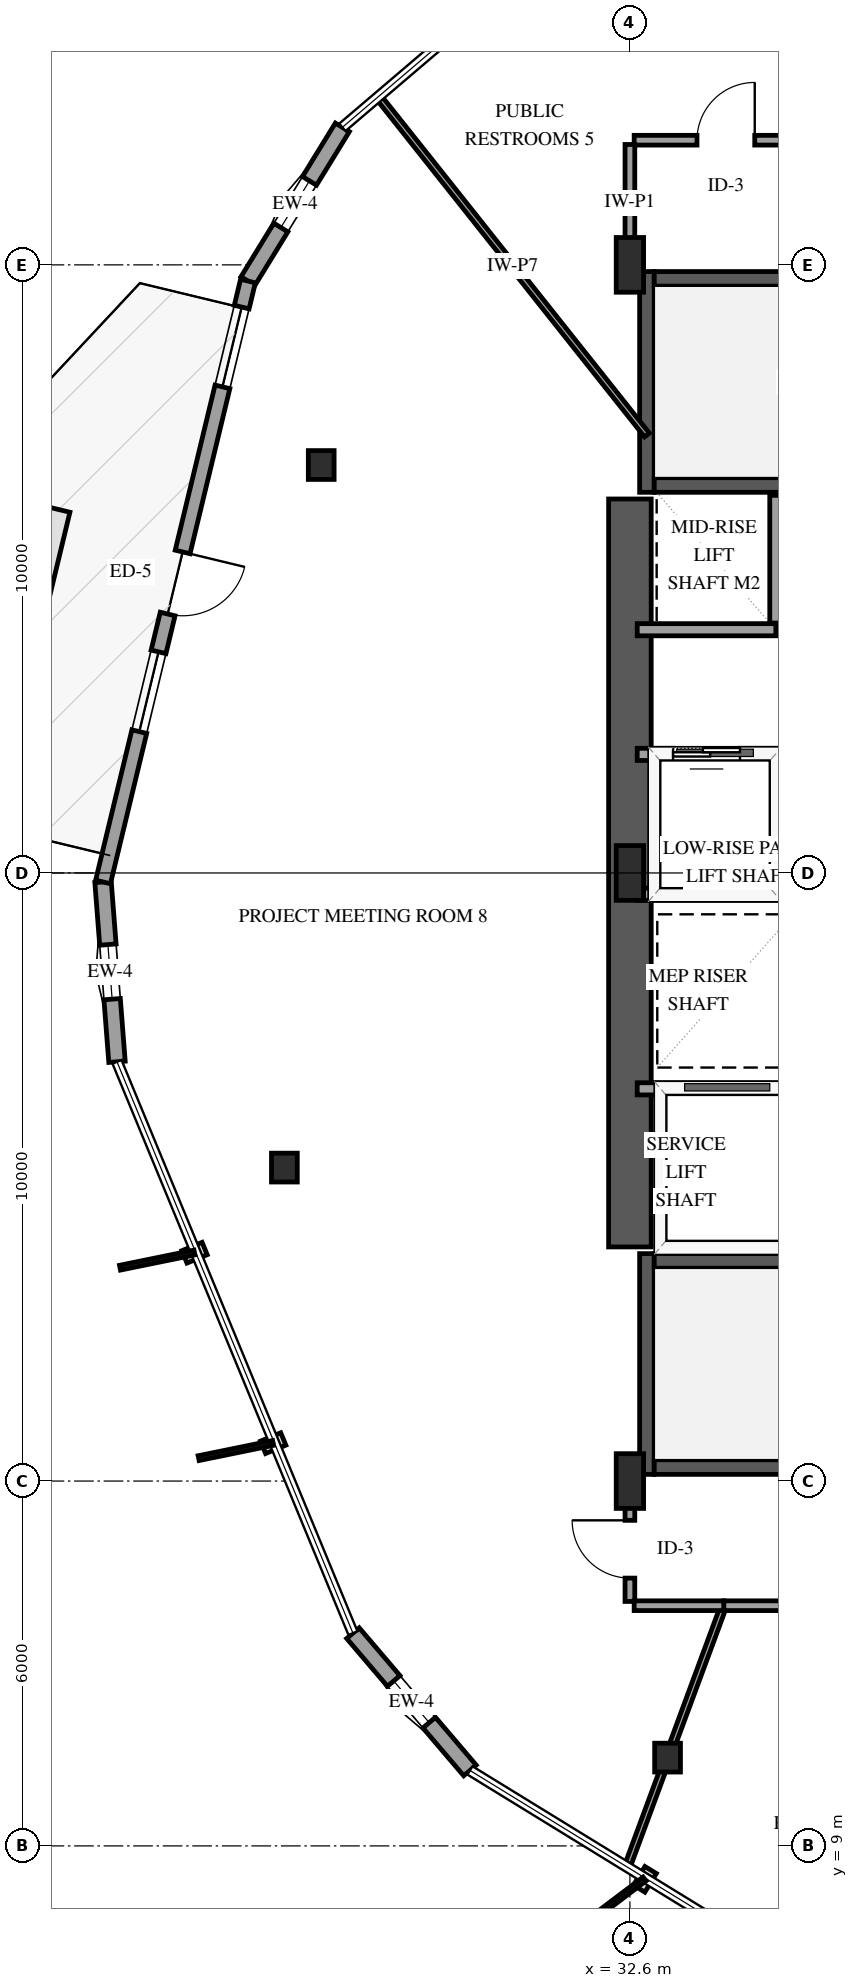
"""IFC4 building model, lengths in metres.
Left out: names, types, materials, properties, quantities, classifications, styles, units other than length and angle.
Written with IfcOpenShell. Run it as: python <this file> out.ifc"""

import sys

from ifc_helpers import new_model, si_unit, direction, frame, frame_2d, origin, origin_2d, place, context, subcontext, project, spatial, rectangle, i_section, extrude, element, fill, save


model = new_model("IFC4")
c1 = context("Model", 3, precision=1e-05, world=origin(), true_north=direction((0.0, 1.0)))
c2 = subcontext(c1, "Body", "Model", "MODEL_VIEW")
j1 = project(units=[si_unit("LENGTHUNIT", "METRE"), si_unit("PLANEANGLEUNIT", "RADIAN")], contexts=[c1])
p1 = place(None, origin())
s1 = spatial("IfcSite", under=j1, at=p1, CompositionType="ELEMENT")
p2 = place(p1, origin())
s2 = spatial("IfcBuilding", under=s1, at=p2, CompositionType="ELEMENT")
p3 = place(p2, frame((0.0, 0.0, 50.6)))
s3 = spatial("IfcBuildingStorey", under=s2, at=p3, CompositionType="ELEMENT", Elevation=50.6)
p4 = place(p3, frame((32.88, 15.11, 0.0), z_axis=(0.0, 0.0, 1.0), x_axis=(0.0, 1.0, 0.0)))
e1 = element("IfcWall", 1, at=p4, inside=s3, PredefinedType="SHEAR", context=c2, shape_type="SweptSolid", body=[
    extrude(rectangle(XDim=3.63, YDim=0.24, at=frame_2d((1.815, 0.0))), origin(), (0.0, 0.0, 1.0), 4.0),
])
for number, where, z_axis, x_axis in (
    (2, (33.0, 15.23, 0.0), (0.0, 0.0, 1.0), (1.0, 0.0, 0.0)),
    (3, (33.0, 18.62, 0.0), (0.0, 0.0, 1.0), (1.0, 0.0, 0.0)),
):
    element("IfcWall", number, at=place(p3, frame(where, z_axis=z_axis, x_axis=x_axis)), inside=s3, PredefinedType="SHEAR", context=c2, shape_type="SweptSolid", body=[
        extrude(rectangle(XDim=8.0, YDim=0.24, at=frame_2d((4.0, 0.0))), origin(), (0.0, 0.0, 1.0), 4.0),
    ])
p5 = place(p3, frame((32.88, 31.26, 0.0), z_axis=(0.0, 0.0, 1.0), x_axis=(0.0, 1.0, 0.0)))
e4 = element("IfcWall", 4, at=p5, inside=s3, PredefinedType="SHEAR", context=c2, shape_type="SweptSolid", body=[
    extrude(rectangle(XDim=3.63, YDim=0.24, at=frame_2d((1.815, 0.0))), origin(), (0.0, 0.0, 1.0), 4.0),
])
for number, where, z_axis, x_axis in (
    (5, (33.0, 31.38, 0.0), (0.0, 0.0, 1.0), (1.0, 0.0, 0.0)),
    (6, (33.0, 34.77, 0.0), (0.0, 0.0, 1.0), (1.0, 0.0, 0.0)),
):
    element("IfcWall", number, at=place(p3, frame(where, z_axis=z_axis, x_axis=x_axis)), inside=s3, PredefinedType="SHEAR", context=c2, shape_type="SweptSolid", body=[
        extrude(rectangle(XDim=8.0, YDim=0.24, at=frame_2d((4.0, 0.0))), origin(), (0.0, 0.0, 1.0), 4.0),
    ])
p6 = place(p3, frame((32.6, 18.85, 0.0), z_axis=(0.0, 0.0, 1.0), x_axis=(0.0, 1.0, 0.0)))
e7 = element("IfcWall", 7, at=p6, inside=s3, PredefinedType="SHEAR", context=c2, shape_type="SweptSolid", body=[
    extrude(rectangle(XDim=12.3, YDim=0.7, at=frame_2d((6.15, 0.0))), origin(), (0.0, 0.0, 1.0), 4.0),
])
for number, where, z_axis, x_axis in (
    (8, (32.6, 15.0, 0.0), (0.0, 0.0, 1.0), (1.0, 0.0, 0.0)),
    (9, (32.6, 25.0, 0.0), (0.0, 0.0, 1.0), (1.0, 0.0, 0.0)),
    (10, (32.6, 35.0, 0.0), (0.0, 0.0, 1.0), (1.0, 0.0, 0.0)),
):
    element("IfcColumn", number, at=place(p3, frame(where, z_axis=z_axis, x_axis=x_axis)), inside=s3, PredefinedType="PILASTER", context=c2, shape_type="SweptSolid", body=[
        extrude(rectangle(XDim=0.45, YDim=0.9, at=origin_2d()), origin(), (0.0, 0.0, 1.0), 4.0),
    ])
for number, where, z_axis, x_axis in (
    (11, (27.523, 31.708, 0.0), (0.0, 0.0, 1.0), (1.0, 0.0, 0.0)),
    (12, (26.918, 20.155, 0.0), (0.0, 0.0, 1.0), (1.0, 0.0, 0.0)),
    (13, (33.219, 10.452, 0.0), (0.0, 0.0, 1.0), (1.0, 0.0, 0.0)),
):
    element("IfcColumn", number, at=place(p3, frame(where, z_axis=z_axis, x_axis=x_axis)), inside=s3, PredefinedType="COLUMN", context=c2, shape_type="SweptSolid", body=[
        extrude(i_section(OverallWidth=0.424, OverallDepth=0.474, WebThickness=0.048, FlangeThickness=0.077, FilletRadius=0.038, at=origin_2d()), origin(), (0.0, 0.0, 1.0), 4.0),
    ])
p7 = place(p3, frame((27.872, 37.262, 0.0), z_axis=(0.0, 0.0, 1.0), x_axis=(-0.523399327402, -0.852087521371, 0.0)))
e14 = element("IfcWall", 14, at=p7, inside=s3, PredefinedType="SOLIDWALL", context=c2, shape_type="SweptSolid", body=[
    extrude(rectangle(XDim=2.967, YDim=0.27, at=frame_2d((1.483, 0.0))), origin(), (0.0, 0.0, 1.0), 3.079),
])
p8 = place(p7, frame((1.033, 0.0, 0.75)))
e15 = element("IfcOpeningElement", 15, at=p8, cuts=e14, PredefinedType="OPENING", context=c2, shape_type="SweptSolid", body=[
    extrude(rectangle(XDim=0.9, YDim=1.5, at=frame_2d((0.45, 0.75))), frame((0.0, 0.145, 0.0), z_axis=(0.0, -1.0, 0.0), x_axis=(1.0, 0.0, 0.0)), (0.0, 0.0, 1.0), 0.29),
])
p9 = place(p3, frame((23.936, 24.852, 0.0), z_axis=(0.0, 0.0, 1.0), x_axis=(0.077363609715, -0.997002944776, 0.0)))
e16 = element("IfcWall", 16, at=p9, inside=s3, PredefinedType="SOLIDWALL", context=c2, shape_type="SweptSolid", body=[
    extrude(rectangle(XDim=2.966, YDim=0.27, at=frame_2d((1.483, 0.0))), origin(), (0.0, 0.0, 1.0), 3.079),
])
p10 = place(p9, frame((1.033, 0.0, 0.75)))
e17 = element("IfcOpeningElement", 17, at=p10, cuts=e16, PredefinedType="OPENING", context=c2, shape_type="SweptSolid", body=[
    extrude(rectangle(XDim=0.9, YDim=1.5, at=frame_2d((0.45, 0.75))), frame((0.0, 0.145, 0.0), z_axis=(0.0, -1.0, 0.0), x_axis=(1.0, 0.0, 0.0)), (0.0, 0.0, 1.0), 0.29),
])
p11 = place(p3, frame((26.319, 34.734, 0.0), z_axis=(0.0, 0.0, 1.0), x_axis=(-0.234457403368, -0.972126394049, 0.0)))
e18 = element("IfcWall", 18, at=p11, inside=s3, PredefinedType="SOLIDWALL", context=c2, shape_type="SweptSolid", body=[
    extrude(rectangle(XDim=10.165, YDim=0.25, at=frame_2d((5.083, 0.0))), origin(), (0.0, 0.0, 1.0), 3.079),
])
p12 = place(p11, frame((4.583, 0.0, 0.0)))
e19 = element("IfcOpeningElement", 19, at=p12, cuts=e18, PredefinedType="OPENING", context=c2, shape_type="SweptSolid", body=[
    extrude(rectangle(XDim=1.05, YDim=2.15, at=frame_2d((0.525, 1.075))), frame((0.0, 0.135, 0.0), z_axis=(0.0, -1.0, 0.0), x_axis=(1.0, 0.0, 0.0)), (0.0, 0.0, 1.0), 0.27),
])
p13 = place(p11, frame((0.44, 0.0, 0.72)))
e20 = element("IfcOpeningElement", 20, at=p13, cuts=e18, PredefinedType="OPENING", context=c2, shape_type="SweptSolid", body=[
    extrude(rectangle(XDim=1.35, YDim=1.65, at=frame_2d((0.675, 0.825))), frame((0.0, 0.135, 0.0), z_axis=(0.0, -1.0, 0.0), x_axis=(1.0, 0.0, 0.0)), (0.0, 0.0, 1.0), 0.27),
])
p14 = place(p11, frame((6.273, 0.0, 0.72)))
e21 = element("IfcOpeningElement", 21, at=p14, cuts=e18, PredefinedType="OPENING", context=c2, shape_type="SweptSolid", body=[
    extrude(rectangle(XDim=1.35, YDim=1.65, at=frame_2d((0.675, 0.825))), frame((0.0, 0.135, 0.0), z_axis=(0.0, -1.0, 0.0), x_axis=(1.0, 0.0, 0.0)), (0.0, 0.0, 1.0), 0.27),
])
p15 = place(p3, frame((28.045, 12.499, 0.0), z_axis=(0.0, 0.0, 1.0), x_axis=(0.648613054241, -0.761118325799, 0.0)))
e22 = element("IfcWall", 22, at=p15, inside=s3, PredefinedType="SOLIDWALL", context=c2, shape_type="SweptSolid", body=[
    extrude(rectangle(XDim=2.967, YDim=0.27, at=frame_2d((1.483, 0.0))), origin(), (0.0, 0.0, 1.0), 3.079),
])
p16 = place(p15, frame((1.033, 0.0, 0.75)))
e23 = element("IfcOpeningElement", 23, at=p16, cuts=e22, PredefinedType="OPENING", context=c2, shape_type="SweptSolid", body=[
    extrude(rectangle(XDim=0.9, YDim=1.5, at=frame_2d((0.45, 0.75))), frame((0.0, 0.145, 0.0), z_axis=(0.0, -1.0, 0.0), x_axis=(1.0, 0.0, 0.0)), (0.0, 0.0, 1.0), 0.29),
])
p17 = place(p3, frame((32.72, 21.45, 0.0), z_axis=(0.0, 0.0, 1.0), x_axis=(1.0, 0.0, 0.0)))
e24 = element("IfcWall", 24, at=p17, inside=s3, PredefinedType="SOLIDWALL", context=c2, shape_type="SweptSolid", body=[
    extrude(rectangle(XDim=2.58, YDim=0.2, at=frame_2d((1.29, 0.0))), origin(), (0.0, 0.0, 1.0), 3.7),
])
p18 = place(p3, frame((32.72, 24.65, 0.0), z_axis=(0.0, 0.0, 1.0), x_axis=(1.0, 0.0, 0.0)))
e25 = element("IfcWall", 25, at=p18, inside=s3, PredefinedType="SOLIDWALL", context=c2, shape_type="SweptSolid", body=[
    extrude(rectangle(XDim=2.28, YDim=0.2, at=frame_2d((1.14, 0.0))), origin(), (0.0, 0.0, 1.0), 3.7),
])
p19 = place(p3, frame((32.72, 26.95, 0.0), z_axis=(0.0, 0.0, 1.0), x_axis=(1.0, 0.0, 0.0)))
e26 = element("IfcWall", 26, at=p19, inside=s3, PredefinedType="SOLIDWALL", context=c2, shape_type="SweptSolid", body=[
    extrude(rectangle(XDim=2.28, YDim=0.2, at=frame_2d((1.14, 0.0))), origin(), (0.0, 0.0, 1.0), 3.7),
])
p20 = place(p19, frame((0.59, 0.0, 0.0)))
e27 = element("IfcOpeningElement", 27, at=p20, cuts=e26, PredefinedType="OPENING", context=c2, shape_type="SweptSolid", body=[
    extrude(rectangle(XDim=1.1, YDim=2.15, at=frame_2d((0.55, 1.075))), frame((0.0, 0.11, 0.0), z_axis=(0.0, -1.0, 0.0), x_axis=(1.0, 0.0, 0.0)), (0.0, 0.0, 1.0), 0.22),
])
p21 = place(p3, frame((35.0, 24.76, 0.0), z_axis=(0.0, 0.0, 1.0), x_axis=(0.0, 1.0, 0.0)))
e28 = element("IfcWall", 28, at=p21, inside=s3, PredefinedType="SOLIDWALL", context=c2, shape_type="SweptSolid", body=[
    extrude(rectangle(XDim=2.08, YDim=0.2, at=frame_2d((1.04, 0.0))), origin(), (0.0, 0.0, 1.0), 3.7),
])
p22 = place(p3, frame((32.72, 29.0, 0.0), z_axis=(0.0, 0.0, 1.0), x_axis=(1.0, 0.0, 0.0)))
e29 = element("IfcWall", 29, at=p22, inside=s3, PredefinedType="SOLIDWALL", context=c2, shape_type="SweptSolid", body=[
    extrude(rectangle(XDim=2.28, YDim=0.2, at=frame_2d((1.14, 0.0))), origin(), (0.0, 0.0, 1.0), 3.7),
])
p23 = place(p3, frame((35.0, 29.11, 0.0), z_axis=(0.0, 0.0, 1.0), x_axis=(0.0, 1.0, 0.0)))
e30 = element("IfcWall", 30, at=p23, inside=s3, PredefinedType="SOLIDWALL", context=c2, shape_type="SweptSolid", body=[
    extrude(rectangle(XDim=2.1, YDim=0.2, at=frame_2d((1.05, 0.0))), origin(), (0.0, 0.0, 1.0), 3.7),
])
p24 = place(p3, frame((32.88, 32.202, 0.0), z_axis=(0.0, 0.0, 1.0), x_axis=(-0.621908178435, 0.783090172072, 0.0)))
e31 = element("IfcWall", 31, at=p24, inside=s3, PredefinedType="PARTITIONING", context=c2, shape_type="SweptSolid", body=[
    extrude(rectangle(XDim=7.104, YDim=0.1, at=frame_2d((3.552, 0.0))), origin(), (0.0, 0.0, 1.0), 3.7),
])
p25 = place(p3, frame((35.687, 37.05, 0.0), z_axis=(0.0, 0.0, 1.0), x_axis=(-0.235013634281, 0.971992073888, 0.0)))
e32 = element("IfcWall", 32, at=p25, inside=s3, PredefinedType="PARTITIONING", context=c2, shape_type="SweptSolid", body=[
    extrude(rectangle(XDim=5.863, YDim=0.13, at=frame_2d((2.932, 0.0))), origin(), (0.0, 0.0, 1.0), 2.995),
])
p26 = place(p3, frame((34.143, 12.95, 0.0), z_axis=(0.0, 0.0, 1.0), x_axis=(-0.346937618719, -0.93788820694, 0.0)))
e33 = element("IfcWall", 33, at=p26, inside=s3, PredefinedType="PARTITIONING", context=c2, shape_type="SweptSolid", body=[
    extrude(rectangle(XDim=4.58, YDim=0.1, at=frame_2d((2.29, 0.0))), origin(), (0.0, 0.0, 1.0), 2.995),
])
p27 = place(p3, frame((38.479, 12.95, 0.0), z_axis=(0.0, 0.0, 1.0), x_axis=(-1.0, 0.0, 0.0)))
e34 = element("IfcWall", 34, at=p27, inside=s3, PredefinedType="PARTITIONING", context=c2, shape_type="SweptSolid", body=[
    extrude(rectangle(XDim=4.336, YDim=0.16, at=frame_2d((2.168, 0.0))), origin(), (0.0, 0.0, 1.0), 3.7),
])
p28 = place(p27, frame((1.693, 0.0, 0.0)))
e35 = element("IfcOpeningElement", 35, at=p28, cuts=e34, PredefinedType="OPENING", context=c2, shape_type="SweptSolid", body=[
    extrude(rectangle(XDim=0.95, YDim=2.15, at=frame_2d((0.475, 1.075))), frame((0.0, 0.09, 0.0), z_axis=(0.0, -1.0, 0.0), x_axis=(1.0, 0.0, 0.0)), (0.0, 0.0, 1.0), 0.18),
])
p29 = place(p3, frame((32.67, 37.05, 0.0), z_axis=(0.0, 0.0, 1.0), x_axis=(1.0, 0.0, 0.0)))
e36 = element("IfcWall", 36, at=p29, inside=s3, PredefinedType="PARTITIONING", context=c2, shape_type="SweptSolid", body=[
    extrude(rectangle(XDim=3.017, YDim=0.16, at=frame_2d((1.509, 0.0))), origin(), (0.0, 0.0, 1.0), 3.7),
])
p30 = place(p29, frame((1.033, 0.0, 0.0)))
e37 = element("IfcOpeningElement", 37, at=p30, cuts=e36, PredefinedType="OPENING", context=c2, shape_type="SweptSolid", body=[
    extrude(rectangle(XDim=0.95, YDim=2.15, at=frame_2d((0.475, 1.075))), frame((0.0, 0.09, 0.0), z_axis=(0.0, -1.0, 0.0), x_axis=(1.0, 0.0, 0.0)), (0.0, 0.0, 1.0), 0.18),
])
p31 = place(p3, frame((32.6, 13.02, 0.0), z_axis=(0.0, 0.0, 1.0), x_axis=(0.0, 1.0, 0.0)))
e38 = element("IfcWall", 38, at=p31, inside=s3, PredefinedType="PARTITIONING", context=c2, shape_type="SweptSolid", body=[
    extrude(rectangle(XDim=1.91, YDim=0.16, at=frame_2d((0.955, 0.0))), origin(), (0.0, 0.0, 1.0), 3.7),
])
p32 = place(p31, frame((0.384, 0.0, 0.0)))
e39 = element("IfcOpeningElement", 39, at=p32, cuts=e38, PredefinedType="OPENING", context=c2, shape_type="SweptSolid", body=[
    extrude(rectangle(XDim=0.95, YDim=2.15, at=frame_2d((0.475, 1.075))), frame((0.0, 0.09, 0.0), z_axis=(0.0, -1.0, 0.0), x_axis=(1.0, 0.0, 0.0)), (0.0, 0.0, 1.0), 0.18),
])
p33 = place(p3, frame((32.6, 35.07, 0.0), z_axis=(0.0, 0.0, 1.0), x_axis=(0.0, 1.0, 0.0)))
e40 = element("IfcWall", 40, at=p33, inside=s3, PredefinedType="PARTITIONING", context=c2, shape_type="SweptSolid", body=[
    extrude(rectangle(XDim=1.91, YDim=0.16, at=frame_2d((0.955, 0.0))), origin(), (0.0, 0.0, 1.0), 3.7),
])
p34 = place(p3, frame((34.143, 12.95, 0.0), z_axis=(0.0, 0.0, 1.0), x_axis=(-1.0, 0.0, 0.0)))
e41 = element("IfcWall", 41, at=p34, inside=s3, PredefinedType="PARTITIONING", context=c2, shape_type="SweptSolid", body=[
    extrude(rectangle(XDim=1.473, YDim=0.16, at=frame_2d((0.737, 0.0))), origin(), (0.0, 0.0, 1.0), 3.7),
])
p35 = place(p8, origin())
e42 = element("IfcWindow", 42, at=p35, inside=s3, PartitioningType="SINGLE_PANEL", PredefinedType="WINDOW", context=c2, shape_type="SweptSolid", body=[
    extrude(rectangle(XDim=0.9, YDim=1.5, at=frame_2d((0.45, 0.75))), frame((0.0, 0.03, 0.0), z_axis=(0.0, -1.0, 0.0), x_axis=(1.0, 0.0, 0.0)), (0.0, 0.0, 1.0), 0.06),
])
fill(e15, e42)
p36 = place(p10, origin())
e43 = element("IfcWindow", 43, at=p36, inside=s3, PartitioningType="SINGLE_PANEL", PredefinedType="WINDOW", context=c2, shape_type="SweptSolid", body=[
    extrude(rectangle(XDim=0.9, YDim=1.5, at=frame_2d((0.45, 0.75))), frame((0.0, 0.03, 0.0), z_axis=(0.0, -1.0, 0.0), x_axis=(1.0, 0.0, 0.0)), (0.0, 0.0, 1.0), 0.06),
])
fill(e17, e43)
p37 = place(p12, origin())
e44 = element("IfcDoor", 44, at=p37, inside=s3, OperationType="SINGLE_SWING_LEFT", PredefinedType="DOOR", context=c2, shape_type="SweptSolid", body=[
    extrude(rectangle(XDim=1.05, YDim=2.15, at=frame_2d((0.525, 1.075))), frame((0.0, 0.025, 0.0), z_axis=(0.0, -1.0, 0.0), x_axis=(1.0, 0.0, 0.0)), (0.0, 0.0, 1.0), 0.05),
])
fill(e19, e44)
p38 = place(p13, origin())
e45 = element("IfcWindow", 45, at=p38, inside=s3, PartitioningType="SINGLE_PANEL", PredefinedType="WINDOW", context=c2, shape_type="SweptSolid", body=[
    extrude(rectangle(XDim=1.35, YDim=1.65, at=frame_2d((0.675, 0.825))), frame((0.0, 0.03, 0.0), z_axis=(0.0, -1.0, 0.0), x_axis=(1.0, 0.0, 0.0)), (0.0, 0.0, 1.0), 0.06),
])
fill(e20, e45)
p39 = place(p14, origin())
e46 = element("IfcWindow", 46, at=p39, inside=s3, PartitioningType="SINGLE_PANEL", PredefinedType="WINDOW", context=c2, shape_type="SweptSolid", body=[
    extrude(rectangle(XDim=1.35, YDim=1.65, at=frame_2d((0.675, 0.825))), frame((0.0, 0.03, 0.0), z_axis=(0.0, -1.0, 0.0), x_axis=(1.0, 0.0, 0.0)), (0.0, 0.0, 1.0), 0.06),
])
fill(e21, e46)
p40 = place(p16, origin())
e47 = element("IfcWindow", 47, at=p40, inside=s3, PartitioningType="SINGLE_PANEL", PredefinedType="WINDOW", context=c2, shape_type="SweptSolid", body=[
    extrude(rectangle(XDim=0.9, YDim=1.5, at=frame_2d((0.45, 0.75))), frame((0.0, 0.03, 0.0), z_axis=(0.0, -1.0, 0.0), x_axis=(1.0, 0.0, 0.0)), (0.0, 0.0, 1.0), 0.06),
])
fill(e23, e47)
p41 = place(p20, origin())
e48 = element("IfcDoor", 48, at=p41, inside=s3, OperationType="SLIDING_TO_LEFT", PredefinedType="DOOR", context=c2, shape_type="SweptSolid", body=[
    extrude(rectangle(XDim=1.1, YDim=2.15, at=frame_2d((0.55, 1.075))), frame((0.0, 0.025, 0.0), z_axis=(0.0, -1.0, 0.0), x_axis=(1.0, 0.0, 0.0)), (0.0, 0.0, 1.0), 0.05),
])
fill(e27, e48)
p42 = place(p30, origin())
e49 = element("IfcDoor", 49, at=p42, inside=s3, OperationType="SINGLE_SWING_RIGHT", PredefinedType="DOOR", context=c2, shape_type="SweptSolid", body=[
    extrude(rectangle(XDim=0.95, YDim=2.15, at=frame_2d((0.475, 1.075))), frame((0.0, 0.025, 0.0), z_axis=(0.0, -1.0, 0.0), x_axis=(1.0, 0.0, 0.0)), (0.0, 0.0, 1.0), 0.05),
])
fill(e37, e49)
p43 = place(p32, origin())
e50 = element("IfcDoor", 50, at=p43, inside=s3, OperationType="SINGLE_SWING_RIGHT", PredefinedType="DOOR", context=c2, shape_type="SweptSolid", body=[
    extrude(rectangle(XDim=0.95, YDim=2.15, at=frame_2d((0.475, 1.075))), frame((0.0, 0.025, 0.0), z_axis=(0.0, -1.0, 0.0), x_axis=(1.0, 0.0, 0.0)), (0.0, 0.0, 1.0), 0.05),
])
fill(e39, e50)
save(model, sys.argv[1])
